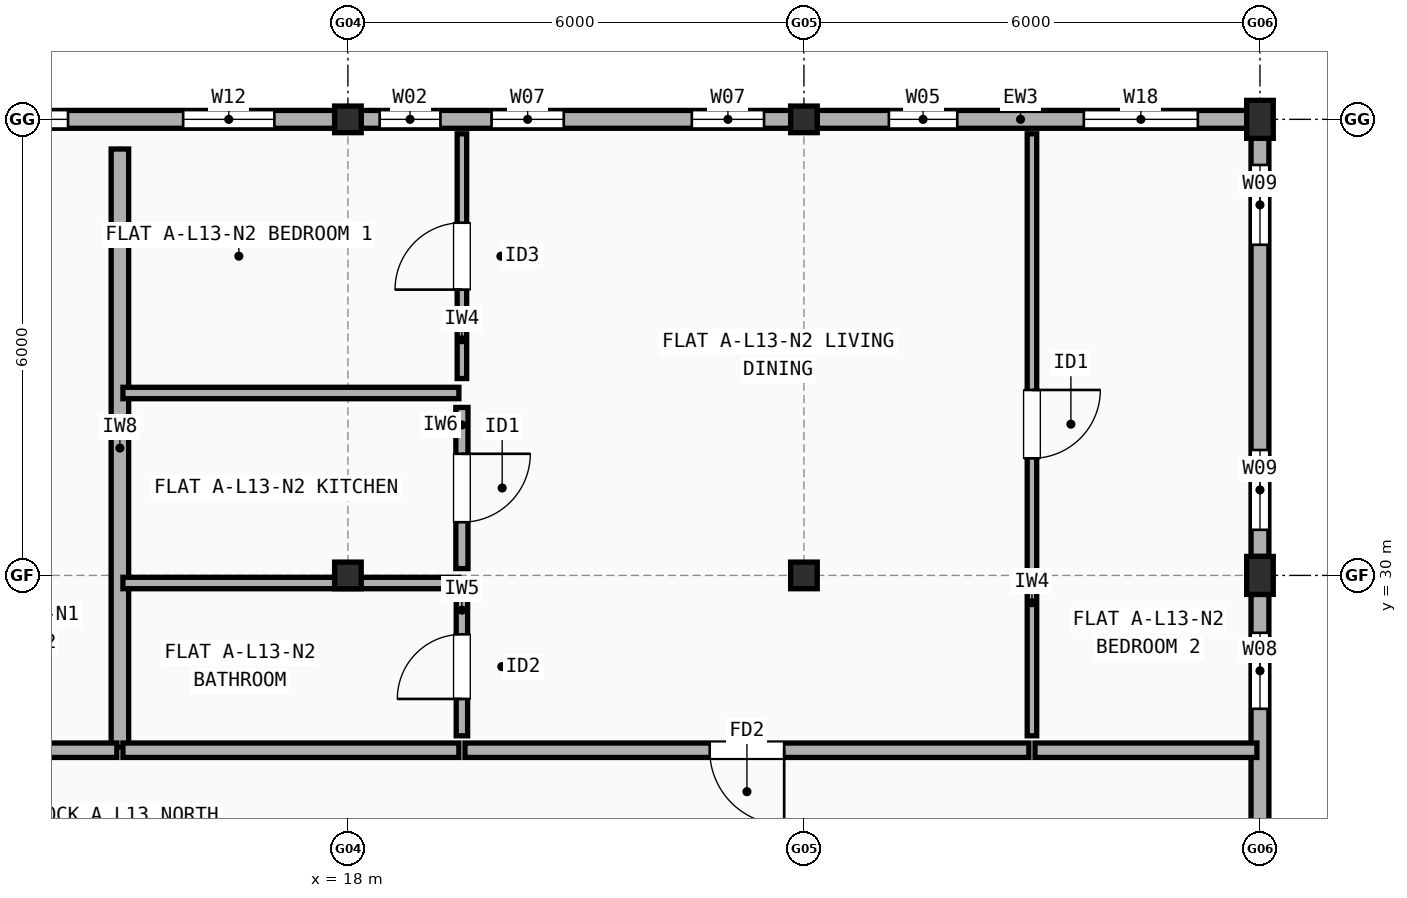
"""IFC4 building model, lengths in metres.
Left out: names, types, materials, properties, quantities, classifications, styles, units other than length and angle.
Written with IfcOpenShell. Run it as: python <this file> out.ifc"""

import sys

from ifc_helpers import new_model, si_unit, direction, frame, frame_2d, origin, origin_2d, place, context, subcontext, project, spatial, rectangle, extrude, element, fill, save


model = new_model("IFC4")
c1 = context("Model", 3, precision=1e-05, world=origin(), true_north=direction((0.0, 1.0)))
c2 = subcontext(c1, "Body", "Model", "MODEL_VIEW")
j1 = project(units=[si_unit("LENGTHUNIT", "METRE"), si_unit("PLANEANGLEUNIT", "RADIAN")], contexts=[c1])
p1 = place(None, origin())
s1 = spatial("IfcSite", under=j1, at=p1, CompositionType="ELEMENT")
p2 = place(p1, origin())
s2 = spatial("IfcBuilding", under=s1, at=p2, CompositionType="ELEMENT")
p3 = place(p2, frame((0.0, 0.0, 42.9)))
s3 = spatial("IfcBuildingStorey", under=s2, at=p3, CompositionType="ELEMENT", Elevation=42.9)
for number, where, z_axis, x_axis in (
    (1, (18.0, 30.0, 0.0), (0.0, 0.0, 1.0), (1.0, 0.0, 0.0)),
    (2, (18.0, 36.0, 0.0), (0.0, 0.0, 1.0), (1.0, 0.0, 0.0)),
    (3, (24.0, 30.0, 0.0), (0.0, 0.0, 1.0), (1.0, 0.0, 0.0)),
    (4, (24.0, 36.0, 0.0), (0.0, 0.0, 1.0), (1.0, 0.0, 0.0)),
):
    element("IfcColumn", number, at=place(p3, frame(where, z_axis=z_axis, x_axis=x_axis)), inside=s3, PredefinedType="COLUMN", context=c2, shape_type="SweptSolid", body=[
        extrude(rectangle(XDim=0.35, YDim=0.35, at=origin_2d()), origin(), (0.0, 0.0, 1.0), 3.005),
    ])
for number, where, z_axis, x_axis in (
    (5, (30.0, 30.0, 0.0), (0.0, 0.0, 1.0), (1.0, 0.0, 0.0)),
    (6, (30.0, 36.0, 0.0), (0.0, 0.0, 1.0), (1.0, 0.0, 0.0)),
):
    element("IfcColumn", number, at=place(p3, frame(where, z_axis=z_axis, x_axis=x_axis)), inside=s3, PredefinedType="COLUMN", context=c2, shape_type="SweptSolid", body=[
        extrude(rectangle(XDim=0.35, YDim=0.5, at=origin_2d()), origin(), (0.0, 0.0, 1.0), 3.005),
    ])
p4 = place(p3, frame((30.0, 24.25, 0.0), z_axis=(0.0, 0.0, 1.0), x_axis=(0.0, 1.0, 0.0)))
e7 = element("IfcWall", 7, at=p4, inside=s3, PredefinedType="STANDARD", context=c2, shape_type="SweptSolid", body=[
    extrude(rectangle(XDim=5.5, YDim=0.235, at=frame_2d((2.75, 0.0))), origin(), (0.0, 0.0, 1.0), 2.487),
])
p5 = place(p4, frame((1.23, 0.0, 0.9)))
e8 = element("IfcOpeningElement", 8, at=p5, cuts=e7, PredefinedType="OPENING", context=c2, shape_type="SweptSolid", body=[
    extrude(rectangle(XDim=0.95, YDim=1.35, at=frame_2d((0.475, 0.675))), frame((0.0, 0.127, 0.0), z_axis=(0.0, -1.0, 0.0), x_axis=(1.0, 0.0, 0.0)), (0.0, 0.0, 1.0), 0.255),
])
p6 = place(p4, frame((3.995, 0.0, 0.9)))
e9 = element("IfcOpeningElement", 9, at=p6, cuts=e7, PredefinedType="OPENING", context=c2, shape_type="SweptSolid", body=[
    extrude(rectangle(XDim=1.0, YDim=1.4, at=frame_2d((0.5, 0.7))), frame((0.0, 0.127, 0.0), z_axis=(0.0, -1.0, 0.0), x_axis=(1.0, 0.0, 0.0)), (0.0, 0.0, 1.0), 0.255),
])
p7 = place(p3, frame((30.0, 30.25, 0.0), z_axis=(0.0, 0.0, 1.0), x_axis=(0.0, 1.0, 0.0)))
e10 = element("IfcWall", 10, at=p7, inside=s3, PredefinedType="STANDARD", context=c2, shape_type="SweptSolid", body=[
    extrude(rectangle(XDim=5.5, YDim=0.235, at=frame_2d((2.75, 0.0))), origin(), (0.0, 0.0, 1.0), 2.487),
])
p8 = place(p7, frame((0.35, 0.0, 0.9)))
e11 = element("IfcOpeningElement", 11, at=p8, cuts=e10, PredefinedType="OPENING", context=c2, shape_type="SweptSolid", body=[
    extrude(rectangle(XDim=1.05, YDim=1.35, at=frame_2d((0.525, 0.675))), frame((0.0, 0.127, 0.0), z_axis=(0.0, -1.0, 0.0), x_axis=(1.0, 0.0, 0.0)), (0.0, 0.0, 1.0), 0.255),
])
p9 = place(p7, frame((4.1, 0.0, 0.9)))
e12 = element("IfcOpeningElement", 12, at=p9, cuts=e10, PredefinedType="OPENING", context=c2, shape_type="SweptSolid", body=[
    extrude(rectangle(XDim=1.05, YDim=1.35, at=frame_2d((0.525, 0.675))), frame((0.0, 0.127, 0.0), z_axis=(0.0, -1.0, 0.0), x_axis=(1.0, 0.0, 0.0)), (0.0, 0.0, 1.0), 0.255),
])
p10 = place(p3, frame((29.825, 36.0, 0.0), z_axis=(0.0, 0.0, 1.0), x_axis=(-1.0, 0.0, 0.0)))
e13 = element("IfcWall", 13, at=p10, inside=s3, PredefinedType="STANDARD", context=c2, shape_type="SweptSolid", body=[
    extrude(rectangle(XDim=5.65, YDim=0.235, at=frame_2d((2.825, 0.0))), origin(), (0.0, 0.0, 1.0), 2.487),
])
p11 = place(p10, frame((0.643, 0.0, 0.9)))
e14 = element("IfcOpeningElement", 14, at=p11, cuts=e13, PredefinedType="OPENING", context=c2, shape_type="SweptSolid", body=[
    extrude(rectangle(XDim=1.5, YDim=1.4, at=frame_2d((0.75, 0.7))), frame((0.0, 0.127, 0.0), z_axis=(0.0, -1.0, 0.0), x_axis=(1.0, 0.0, 0.0)), (0.0, 0.0, 1.0), 0.255),
])
p12 = place(p10, frame((3.808, 0.0, 0.9)))
e15 = element("IfcOpeningElement", 15, at=p12, cuts=e13, PredefinedType="OPENING", context=c2, shape_type="SweptSolid", body=[
    extrude(rectangle(XDim=0.9, YDim=1.4, at=frame_2d((0.45, 0.7))), frame((0.0, 0.127, 0.0), z_axis=(0.0, -1.0, 0.0), x_axis=(1.0, 0.0, 0.0)), (0.0, 0.0, 1.0), 0.255),
])
p13 = place(p3, frame((23.825, 36.0, 0.0), z_axis=(0.0, 0.0, 1.0), x_axis=(-1.0, 0.0, 0.0)))
e16 = element("IfcWall", 16, at=p13, inside=s3, PredefinedType="STANDARD", context=c2, shape_type="SweptSolid", body=[
    extrude(rectangle(XDim=5.65, YDim=0.235, at=frame_2d((2.825, 0.0))), origin(), (0.0, 0.0, 1.0), 2.487),
])
p14 = place(p13, frame((0.35, 0.0, 0.9)))
e17 = element("IfcOpeningElement", 17, at=p14, cuts=e16, PredefinedType="OPENING", context=c2, shape_type="SweptSolid", body=[
    extrude(rectangle(XDim=0.95, YDim=1.35, at=frame_2d((0.475, 0.675))), frame((0.0, 0.127, 0.0), z_axis=(0.0, -1.0, 0.0), x_axis=(1.0, 0.0, 0.0)), (0.0, 0.0, 1.0), 0.255),
])
p15 = place(p13, frame((2.985, 0.0, 0.9)))
e18 = element("IfcOpeningElement", 18, at=p15, cuts=e16, PredefinedType="OPENING", context=c2, shape_type="SweptSolid", body=[
    extrude(rectangle(XDim=0.95, YDim=1.35, at=frame_2d((0.475, 0.675))), frame((0.0, 0.127, 0.0), z_axis=(0.0, -1.0, 0.0), x_axis=(1.0, 0.0, 0.0)), (0.0, 0.0, 1.0), 0.255),
])
p16 = place(p13, frame((4.607, 0.0, 0.9)))
e19 = element("IfcOpeningElement", 19, at=p16, cuts=e16, PredefinedType="OPENING", context=c2, shape_type="SweptSolid", body=[
    extrude(rectangle(XDim=0.8, YDim=1.2, at=frame_2d((0.4, 0.6))), frame((0.0, 0.127, 0.0), z_axis=(0.0, -1.0, 0.0), x_axis=(1.0, 0.0, 0.0)), (0.0, 0.0, 1.0), 0.255),
])
p17 = place(p3, frame((17.825, 36.0, 0.0), z_axis=(0.0, 0.0, 1.0), x_axis=(-1.0, 0.0, 0.0)))
e20 = element("IfcWall", 20, at=p17, inside=s3, PredefinedType="STANDARD", context=c2, shape_type="SweptSolid", body=[
    extrude(rectangle(XDim=5.65, YDim=0.235, at=frame_2d((2.825, 0.0))), origin(), (0.0, 0.0, 1.0), 2.487),
])
p18 = place(p17, frame((0.792, 0.0, 0.9)))
e21 = element("IfcOpeningElement", 21, at=p18, cuts=e20, PredefinedType="OPENING", context=c2, shape_type="SweptSolid", body=[
    extrude(rectangle(XDim=1.2, YDim=1.35, at=frame_2d((0.6, 0.675))), frame((0.0, 0.127, 0.0), z_axis=(0.0, -1.0, 0.0), x_axis=(1.0, 0.0, 0.0)), (0.0, 0.0, 1.0), 0.255),
])
p19 = place(p17, frame((3.508, 0.0, 0.9)))
e22 = element("IfcOpeningElement", 22, at=p19, cuts=e20, PredefinedType="OPENING", context=c2, shape_type="SweptSolid", body=[
    extrude(rectangle(XDim=1.5, YDim=1.4, at=frame_2d((0.75, 0.7))), frame((0.0, 0.127, 0.0), z_axis=(0.0, -1.0, 0.0), x_axis=(1.0, 0.0, 0.0)), (0.0, 0.0, 1.0), 0.255),
])
p20 = place(p3, frame((15.0, 27.74, 0.0), z_axis=(0.0, 0.0, 1.0), x_axis=(0.0, 1.0, 0.0)))
e23 = element("IfcWall", 23, at=p20, inside=s3, PredefinedType="SOLIDWALL", context=c2, shape_type="SweptSolid", body=[
    extrude(rectangle(XDim=7.87, YDim=0.23, at=frame_2d((3.935, 0.0))), origin(), (0.0, 0.0, 1.0), 2.537),
])
p21 = place(p3, frame((12.04, 27.7, 0.0), z_axis=(0.0, 0.0, 1.0), x_axis=(1.0, 0.0, 0.0)))
e24 = element("IfcWall", 24, at=p21, inside=s3, PredefinedType="SOLIDWALL", context=c2, shape_type="SweptSolid", body=[
    extrude(rectangle(XDim=2.92, YDim=0.19, at=frame_2d((1.46, 0.0))), origin(), (0.0, 0.0, 1.0), 2.508),
])
p22 = place(p3, frame((15.04, 27.7, 0.0), z_axis=(0.0, 0.0, 1.0), x_axis=(1.0, 0.0, 0.0)))
e25 = element("IfcWall", 25, at=p22, inside=s3, PredefinedType="SOLIDWALL", context=c2, shape_type="SweptSolid", body=[
    extrude(rectangle(XDim=4.42, YDim=0.19, at=frame_2d((2.21, 0.0))), origin(), (0.0, 0.0, 1.0), 3.005),
])
p23 = place(p3, frame((19.54, 27.7, 0.0), z_axis=(0.0, 0.0, 1.0), x_axis=(1.0, 0.0, 0.0)))
e26 = element("IfcWall", 26, at=p23, inside=s3, PredefinedType="SOLIDWALL", context=c2, shape_type="SweptSolid", body=[
    extrude(rectangle(XDim=7.42, YDim=0.19, at=frame_2d((3.71, 0.0))), origin(), (0.0, 0.0, 1.0), 3.005),
])
p24 = place(p23, frame((3.22, 0.0, 0.0)))
e27 = element("IfcOpeningElement", 27, at=p24, cuts=e26, PredefinedType="OPENING", context=c2, shape_type="SweptSolid", body=[
    extrude(rectangle(XDim=0.98, YDim=2.15, at=frame_2d((0.49, 1.075))), frame((0.0, 0.105, 0.0), z_axis=(0.0, -1.0, 0.0), x_axis=(1.0, 0.0, 0.0)), (0.0, 0.0, 1.0), 0.21),
])
p25 = place(p3, frame((19.5, 32.59, 0.0), z_axis=(0.0, 0.0, 1.0), x_axis=(0.0, 1.0, 0.0)))
e28 = element("IfcWall", 28, at=p25, inside=s3, PredefinedType="PARTITIONING", context=c2, shape_type="SweptSolid", body=[
    extrude(rectangle(XDim=3.22, YDim=0.125, at=frame_2d((1.61, 0.0))), origin(), (0.0, 0.0, 1.0), 3.005),
])
p26 = place(p25, frame((1.17, 0.0, 0.0)))
e29 = element("IfcOpeningElement", 29, at=p26, cuts=e28, PredefinedType="OPENING", context=c2, shape_type="SweptSolid", body=[
    extrude(rectangle(XDim=0.88, YDim=2.1, at=frame_2d((0.44, 1.05))), frame((0.0, 0.073, 0.0), z_axis=(0.0, -1.0, 0.0), x_axis=(1.0, 0.0, 0.0)), (0.0, 0.0, 1.0), 0.145),
])
p27 = place(p3, frame((19.5, 30.09, 0.0), z_axis=(0.0, 0.0, 1.0), x_axis=(0.0, 1.0, 0.0)))
e30 = element("IfcWall", 30, at=p27, inside=s3, PredefinedType="PLUMBINGWALL", context=c2, shape_type="SweptSolid", body=[
    extrude(rectangle(XDim=2.12, YDim=0.16, at=frame_2d((1.06, 0.0))), origin(), (0.0, 0.0, 1.0), 2.537),
])
p28 = place(p27, frame((0.61, 0.0, 0.0)))
e31 = element("IfcOpeningElement", 31, at=p28, cuts=e30, PredefinedType="OPENING", context=c2, shape_type="SweptSolid", body=[
    extrude(rectangle(XDim=0.9, YDim=2.1, at=frame_2d((0.45, 1.05))), frame((0.0, 0.09, 0.0), z_axis=(0.0, -1.0, 0.0), x_axis=(1.0, 0.0, 0.0)), (0.0, 0.0, 1.0), 0.18),
])
p29 = place(p3, frame((19.5, 27.89, 0.0), z_axis=(0.0, 0.0, 1.0), x_axis=(0.0, 1.0, 0.0)))
e32 = element("IfcWall", 32, at=p29, inside=s3, PredefinedType="PARTITIONING", context=c2, shape_type="SweptSolid", body=[
    extrude(rectangle(XDim=1.82, YDim=0.15, at=frame_2d((0.91, 0.0))), origin(), (0.0, 0.0, 1.0), 3.005),
])
p30 = place(p29, frame((0.485, 0.0, 0.0)))
e33 = element("IfcOpeningElement", 33, at=p30, cuts=e32, PredefinedType="OPENING", context=c2, shape_type="SweptSolid", body=[
    extrude(rectangle(XDim=0.85, YDim=2.1, at=frame_2d((0.425, 1.05))), frame((0.0, 0.085, 0.0), z_axis=(0.0, -1.0, 0.0), x_axis=(1.0, 0.0, 0.0)), (0.0, 0.0, 1.0), 0.17),
])
p31 = place(p3, frame((15.04, 32.4, 0.0), z_axis=(0.0, 0.0, 1.0), x_axis=(1.0, 0.0, 0.0)))
e34 = element("IfcWall", 34, at=p31, inside=s3, PredefinedType="PARTITIONING", context=c2, shape_type="SweptSolid", body=[
    extrude(rectangle(XDim=4.42, YDim=0.15, at=frame_2d((2.21, 0.0))), origin(), (0.0, 0.0, 1.0), 2.508),
])
p32 = place(p3, frame((15.04, 29.9, 0.0), z_axis=(0.0, 0.0, 1.0), x_axis=(1.0, 0.0, 0.0)))
e35 = element("IfcWall", 35, at=p32, inside=s3, PredefinedType="PARTITIONING", context=c2, shape_type="SweptSolid", body=[
    extrude(rectangle(XDim=4.42, YDim=0.15, at=frame_2d((2.21, 0.0))), origin(), (0.0, 0.0, 1.0), 2.537),
])
p33 = place(p3, frame((27.04, 27.7, 0.0), z_axis=(0.0, 0.0, 1.0), x_axis=(1.0, 0.0, 0.0)))
e36 = element("IfcWall", 36, at=p33, inside=s3, PredefinedType="SOLIDWALL", context=c2, shape_type="SweptSolid", body=[
    extrude(rectangle(XDim=2.92, YDim=0.19, at=frame_2d((1.46, 0.0))), origin(), (0.0, 0.0, 1.0), 2.487),
])
p34 = place(p3, frame((27.0, 27.89, 0.0), z_axis=(0.0, 0.0, 1.0), x_axis=(0.0, 1.0, 0.0)))
e37 = element("IfcWall", 37, at=p34, inside=s3, PredefinedType="PARTITIONING", context=c2, shape_type="SweptSolid", body=[
    extrude(rectangle(XDim=7.92, YDim=0.125, at=frame_2d((3.96, 0.0))), origin(), (0.0, 0.0, 1.0), 2.537),
])
p35 = place(p34, frame((3.65, 0.0, 0.0)))
e38 = element("IfcOpeningElement", 38, at=p35, cuts=e37, PredefinedType="OPENING", context=c2, shape_type="SweptSolid", body=[
    extrude(rectangle(XDim=0.9, YDim=2.1, at=frame_2d((0.45, 1.05))), frame((0.0, 0.073, 0.0), z_axis=(0.0, -1.0, 0.0), x_axis=(1.0, 0.0, 0.0)), (0.0, 0.0, 1.0), 0.145),
])
p36 = place(p6, origin())
e39 = element("IfcWindow", 39, at=p36, inside=s3, PartitioningType="SINGLE_PANEL", PredefinedType="WINDOW", context=c2, shape_type="SweptSolid", body=[
    extrude(rectangle(XDim=1.0, YDim=1.4, at=frame_2d((0.5, 0.7))), frame((0.0, 0.03, 0.0), z_axis=(0.0, -1.0, 0.0), x_axis=(1.0, 0.0, 0.0)), (0.0, 0.0, 1.0), 0.06),
])
fill(e9, e39)
p37 = place(p8, origin())
e40 = element("IfcWindow", 40, at=p37, inside=s3, PartitioningType="SINGLE_PANEL", PredefinedType="WINDOW", context=c2, shape_type="SweptSolid", body=[
    extrude(rectangle(XDim=1.05, YDim=1.35, at=frame_2d((0.525, 0.675))), frame((0.0, 0.03, 0.0), z_axis=(0.0, -1.0, 0.0), x_axis=(1.0, 0.0, 0.0)), (0.0, 0.0, 1.0), 0.06),
])
fill(e11, e40)
p38 = place(p9, origin())
e41 = element("IfcWindow", 41, at=p38, inside=s3, PartitioningType="SINGLE_PANEL", PredefinedType="WINDOW", context=c2, shape_type="SweptSolid", body=[
    extrude(rectangle(XDim=1.05, YDim=1.35, at=frame_2d((0.525, 0.675))), frame((0.0, 0.03, 0.0), z_axis=(0.0, -1.0, 0.0), x_axis=(1.0, 0.0, 0.0)), (0.0, 0.0, 1.0), 0.06),
])
fill(e12, e41)
p39 = place(p11, origin())
e42 = element("IfcWindow", 42, at=p39, inside=s3, PartitioningType="SINGLE_PANEL", PredefinedType="WINDOW", context=c2, shape_type="SweptSolid", body=[
    extrude(rectangle(XDim=1.5, YDim=1.4, at=frame_2d((0.75, 0.7))), frame((0.0, 0.03, 0.0), z_axis=(0.0, -1.0, 0.0), x_axis=(1.0, 0.0, 0.0)), (0.0, 0.0, 1.0), 0.06),
])
fill(e14, e42)
p40 = place(p12, origin())
e43 = element("IfcWindow", 43, at=p40, inside=s3, PartitioningType="SINGLE_PANEL", PredefinedType="WINDOW", context=c2, shape_type="SweptSolid", body=[
    extrude(rectangle(XDim=0.9, YDim=1.4, at=frame_2d((0.45, 0.7))), frame((0.0, 0.03, 0.0), z_axis=(0.0, -1.0, 0.0), x_axis=(1.0, 0.0, 0.0)), (0.0, 0.0, 1.0), 0.06),
])
fill(e15, e43)
p41 = place(p14, origin())
e44 = element("IfcWindow", 44, at=p41, inside=s3, PartitioningType="SINGLE_PANEL", PredefinedType="WINDOW", context=c2, shape_type="SweptSolid", body=[
    extrude(rectangle(XDim=0.95, YDim=1.35, at=frame_2d((0.475, 0.675))), frame((0.0, 0.03, 0.0), z_axis=(0.0, -1.0, 0.0), x_axis=(1.0, 0.0, 0.0)), (0.0, 0.0, 1.0), 0.06),
])
fill(e17, e44)
p42 = place(p15, origin())
e45 = element("IfcWindow", 45, at=p42, inside=s3, PartitioningType="SINGLE_PANEL", PredefinedType="WINDOW", context=c2, shape_type="SweptSolid", body=[
    extrude(rectangle(XDim=0.95, YDim=1.35, at=frame_2d((0.475, 0.675))), frame((0.0, 0.03, 0.0), z_axis=(0.0, -1.0, 0.0), x_axis=(1.0, 0.0, 0.0)), (0.0, 0.0, 1.0), 0.06),
])
fill(e18, e45)
p43 = place(p16, origin())
e46 = element("IfcWindow", 46, at=p43, inside=s3, PartitioningType="SINGLE_PANEL", PredefinedType="WINDOW", context=c2, shape_type="SweptSolid", body=[
    extrude(rectangle(XDim=0.8, YDim=1.2, at=frame_2d((0.4, 0.6))), frame((0.0, 0.03, 0.0), z_axis=(0.0, -1.0, 0.0), x_axis=(1.0, 0.0, 0.0)), (0.0, 0.0, 1.0), 0.06),
])
fill(e19, e46)
p44 = place(p18, origin())
e47 = element("IfcWindow", 47, at=p44, inside=s3, PartitioningType="SINGLE_PANEL", PredefinedType="WINDOW", context=c2, shape_type="SweptSolid", body=[
    extrude(rectangle(XDim=1.2, YDim=1.35, at=frame_2d((0.6, 0.675))), frame((0.0, 0.03, 0.0), z_axis=(0.0, -1.0, 0.0), x_axis=(1.0, 0.0, 0.0)), (0.0, 0.0, 1.0), 0.06),
])
fill(e21, e47)
p45 = place(p19, origin())
e48 = element("IfcWindow", 48, at=p45, inside=s3, PartitioningType="SINGLE_PANEL", PredefinedType="WINDOW", context=c2, shape_type="SweptSolid", body=[
    extrude(rectangle(XDim=1.5, YDim=1.4, at=frame_2d((0.75, 0.7))), frame((0.0, 0.03, 0.0), z_axis=(0.0, -1.0, 0.0), x_axis=(1.0, 0.0, 0.0)), (0.0, 0.0, 1.0), 0.06),
])
fill(e22, e48)
p46 = place(p24, origin())
e49 = element("IfcDoor", 49, at=p46, inside=s3, OperationType="SINGLE_SWING_RIGHT", PredefinedType="DOOR", context=c2, shape_type="SweptSolid", body=[
    extrude(rectangle(XDim=0.98, YDim=2.15, at=frame_2d((0.49, 1.075))), frame((0.0, 0.025, 0.0), z_axis=(0.0, -1.0, 0.0), x_axis=(1.0, 0.0, 0.0)), (0.0, 0.0, 1.0), 0.05),
])
fill(e27, e49)
p47 = place(p26, origin())
e50 = element("IfcDoor", 50, at=p47, inside=s3, OperationType="SINGLE_SWING_LEFT", PredefinedType="DOOR", context=c2, shape_type="SweptSolid", body=[
    extrude(rectangle(XDim=0.88, YDim=2.1, at=frame_2d((0.44, 1.05))), frame((0.0, 0.025, 0.0), z_axis=(0.0, -1.0, 0.0), x_axis=(1.0, 0.0, 0.0)), (0.0, 0.0, 1.0), 0.05),
])
fill(e29, e50)
p48 = place(p28, origin())
e51 = element("IfcDoor", 51, at=p48, inside=s3, OperationType="SINGLE_SWING_RIGHT", PredefinedType="DOOR", context=c2, shape_type="SweptSolid", body=[
    extrude(rectangle(XDim=0.9, YDim=2.1, at=frame_2d((0.45, 1.05))), frame((0.0, 0.025, 0.0), z_axis=(0.0, -1.0, 0.0), x_axis=(1.0, 0.0, 0.0)), (0.0, 0.0, 1.0), 0.05),
])
fill(e31, e51)
p49 = place(p30, origin())
e52 = element("IfcDoor", 52, at=p49, inside=s3, OperationType="SINGLE_SWING_LEFT", PredefinedType="DOOR", context=c2, shape_type="SweptSolid", body=[
    extrude(rectangle(XDim=0.85, YDim=2.1, at=frame_2d((0.425, 1.05))), frame((0.0, 0.025, 0.0), z_axis=(0.0, -1.0, 0.0), x_axis=(1.0, 0.0, 0.0)), (0.0, 0.0, 1.0), 0.05),
])
fill(e33, e52)
p50 = place(p35, origin())
e53 = element("IfcDoor", 53, at=p50, inside=s3, OperationType="SINGLE_SWING_RIGHT", PredefinedType="DOOR", context=c2, shape_type="SweptSolid", body=[
    extrude(rectangle(XDim=0.9, YDim=2.1, at=frame_2d((0.45, 1.05))), frame((0.0, 0.025, 0.0), z_axis=(0.0, -1.0, 0.0), x_axis=(1.0, 0.0, 0.0)), (0.0, 0.0, 1.0), 0.05),
])
fill(e38, e53)
save(model, sys.argv[1])
